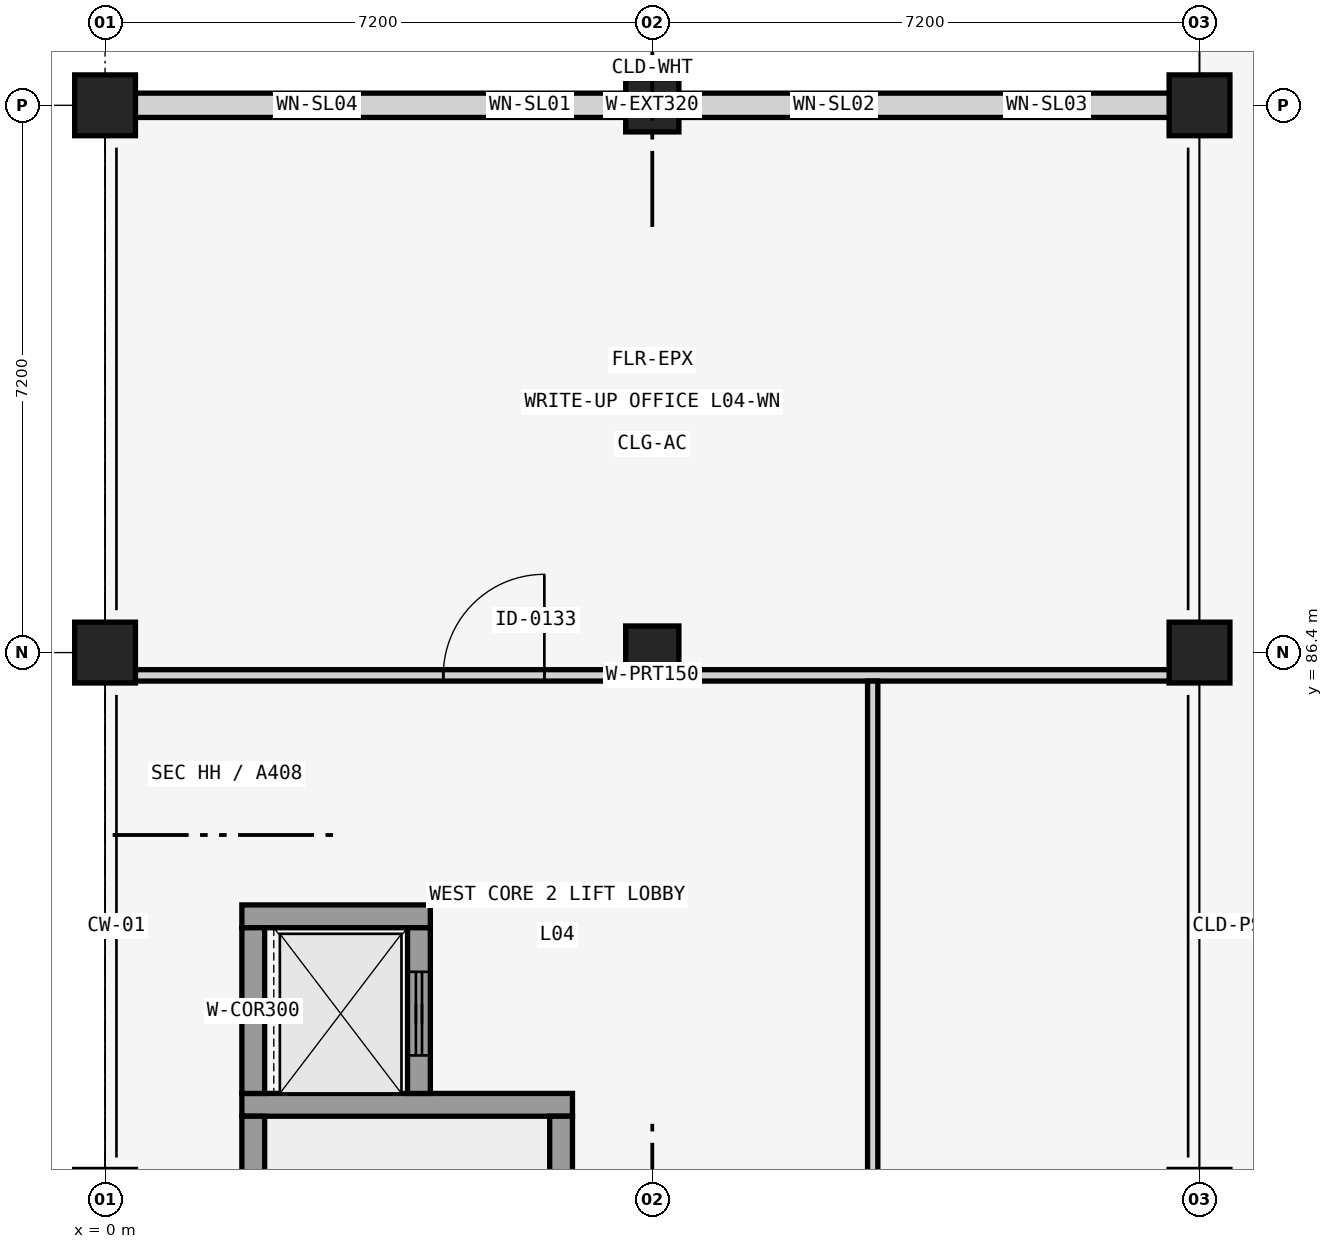
"""IFC4 building model, lengths in metres.
Left out: names, types, materials, properties, quantities, classifications, styles, units other than length and angle.
Written with IfcOpenShell. Run it as: python <this file> out.ifc"""

import sys

from ifc_helpers import new_model, si_unit, direction, frame, frame_2d, origin, origin_2d, place, context, subcontext, project, spatial, rectangle, extrude, element, fill, save


model = new_model("IFC4")
c1 = context("Model", 3, precision=1e-05, world=origin(), true_north=direction((0.0, 1.0)))
c2 = subcontext(c1, "Body", "Model", "MODEL_VIEW")
j1 = project(units=[si_unit("LENGTHUNIT", "METRE"), si_unit("PLANEANGLEUNIT", "RADIAN")], contexts=[c1])
p1 = place(None, origin())
s1 = spatial("IfcSite", under=j1, at=p1, CompositionType="ELEMENT")
p2 = place(p1, origin())
s2 = spatial("IfcBuilding", under=s1, at=p2, CompositionType="ELEMENT")
p3 = place(p2, frame((0.0, 0.0, 17.28)))
s3 = spatial("IfcBuildingStorey", under=s2, at=p3, CompositionType="ELEMENT", Elevation=17.28)
for number, where, z_axis, x_axis in (
    (1, (0.0, 86.4, 0.0), (0.0, 0.0, 1.0), (1.0, 0.0, 0.0)),
    (2, (0.0, 93.6, 0.0), (0.0, 0.0, 1.0), (1.0, 0.0, 0.0)),
):
    element("IfcColumn", number, at=place(p3, frame(where, z_axis=z_axis, x_axis=x_axis)), inside=s3, PredefinedType="COLUMN", context=c2, shape_type="SweptSolid", body=[
        extrude(rectangle(XDim=0.8, YDim=0.8, at=origin_2d()), origin(), (0.0, 0.0, 1.0), 4.16),
    ])
for number, where, z_axis, x_axis in (
    (3, (7.2, 86.4, 0.0), (0.0, 0.0, 1.0), (1.0, 0.0, 0.0)),
    (4, (7.2, 93.6, 0.0), (0.0, 0.0, 1.0), (1.0, 0.0, 0.0)),
):
    element("IfcColumn", number, at=place(p3, frame(where, z_axis=z_axis, x_axis=x_axis)), inside=s3, PredefinedType="COLUMN", context=c2, shape_type="SweptSolid", body=[
        extrude(rectangle(XDim=0.7, YDim=0.7, at=origin_2d()), origin(), (0.0, 0.0, 1.0), 4.16),
    ])
for number, where, z_axis, x_axis in (
    (5, (14.4, 86.4, 0.0), (0.0, 0.0, 1.0), (1.0, 0.0, 0.0)),
    (6, (14.4, 93.6, 0.0), (0.0, 0.0, 1.0), (1.0, 0.0, 0.0)),
):
    element("IfcColumn", number, at=place(p3, frame(where, z_axis=z_axis, x_axis=x_axis)), inside=s3, PredefinedType="COLUMN", context=c2, shape_type="SweptSolid", body=[
        extrude(rectangle(XDim=0.8, YDim=0.8, at=origin_2d()), origin(), (0.0, 0.0, 1.0), 4.16),
    ])
p4 = place(p3, frame((0.39, 93.6, 0.0), z_axis=(0.0, 0.0, 1.0), x_axis=(1.0, 0.0, 0.0)))
e7 = element("IfcWall", 7, at=p4, inside=s3, PredefinedType="SOLIDWALL", context=c2, shape_type="SweptSolid", body=[
    extrude(rectangle(XDim=13.62, YDim=0.32, at=frame_2d((6.81, 0.0))), origin(), (0.0, 0.0, 1.0), 3.42),
])
p5 = place(p4, frame((2.175, 0.0, 0.85)))
e8 = element("IfcOpeningElement", 8, at=p5, cuts=e7, PredefinedType="OPENING", context=c2, shape_type="SweptSolid", body=[
    extrude(rectangle(XDim=0.45, YDim=2.1, at=frame_2d((0.225, 1.05))), frame((0.0, 0.17, 0.0), z_axis=(0.0, -1.0, 0.0), x_axis=(1.0, 0.0, 0.0)), (0.0, 0.0, 1.0), 0.34),
])
p6 = place(p4, frame((4.975, 0.0, 0.85)))
e9 = element("IfcOpeningElement", 9, at=p6, cuts=e7, PredefinedType="OPENING", context=c2, shape_type="SweptSolid", body=[
    extrude(rectangle(XDim=0.45, YDim=2.4, at=frame_2d((0.225, 1.2))), frame((0.0, 0.17, 0.0), z_axis=(0.0, -1.0, 0.0), x_axis=(1.0, 0.0, 0.0)), (0.0, 0.0, 1.0), 0.34),
])
p7 = place(p4, frame((8.95, 0.0, 0.85)))
e10 = element("IfcOpeningElement", 10, at=p7, cuts=e7, PredefinedType="OPENING", context=c2, shape_type="SweptSolid", body=[
    extrude(rectangle(XDim=0.5, YDim=2.4, at=frame_2d((0.25, 1.2))), frame((0.0, 0.17, 0.0), z_axis=(0.0, -1.0, 0.0), x_axis=(1.0, 0.0, 0.0)), (0.0, 0.0, 1.0), 0.34),
])
p8 = place(p4, frame((11.725, 0.0, 0.85)))
e11 = element("IfcOpeningElement", 11, at=p8, cuts=e7, PredefinedType="OPENING", context=c2, shape_type="SweptSolid", body=[
    extrude(rectangle(XDim=0.55, YDim=2.2, at=frame_2d((0.275, 1.1))), frame((0.0, 0.17, 0.0), z_axis=(0.0, -1.0, 0.0), x_axis=(1.0, 0.0, 0.0)), (0.0, 0.0, 1.0), 0.34),
])
p9 = place(p3, frame((1.8, 80.45, 0.0), z_axis=(0.0, 0.0, 1.0), x_axis=(1.0, 0.0, 0.0)))
e12 = element("IfcWall", 12, at=p9, inside=s3, PredefinedType="SHEAR", context=c2, shape_type="SweptSolid", body=[
    extrude(rectangle(XDim=4.35, YDim=0.3, at=frame_2d((2.175, 0.0))), origin(), (0.0, 0.0, 1.0), 3.81),
])
p10 = place(p3, frame((1.95, 72.5, 0.0), z_axis=(0.0, 0.0, 1.0), x_axis=(0.0, 1.0, 0.0)))
e13 = element("IfcWall", 13, at=p10, inside=s3, PredefinedType="SHEAR", context=c2, shape_type="SweptSolid", body=[
    extrude(rectangle(XDim=7.8, YDim=0.3, at=frame_2d((3.9, 0.0))), origin(), (0.0, 0.0, 1.0), 3.81),
])
p11 = place(p3, frame((6.0, 72.5, 0.0), z_axis=(0.0, 0.0, 1.0), x_axis=(0.0, 1.0, 0.0)))
e14 = element("IfcWall", 14, at=p11, inside=s3, PredefinedType="SHEAR", context=c2, shape_type="SweptSolid", body=[
    extrude(rectangle(XDim=7.8, YDim=0.3, at=frame_2d((3.9, 0.0))), origin(), (0.0, 0.0, 1.0), 3.81),
])
p12 = place(p11, frame((0.4, 0.0, 0.0)))
e15 = element("IfcOpeningElement", 15, at=p12, cuts=e14, PredefinedType="OPENING", context=c2, shape_type="SweptSolid", body=[
    extrude(rectangle(XDim=1.15, YDim=2.2, at=frame_2d((0.575, 1.1))), frame((0.0, 0.16, 0.0), z_axis=(0.0, -1.0, 0.0), x_axis=(1.0, 0.0, 0.0)), (0.0, 0.0, 1.0), 0.32),
])
p13 = place(p3, frame((1.8, 82.93, 0.0), z_axis=(0.0, 0.0, 1.0), x_axis=(1.0, 0.0, 0.0)))
e16 = element("IfcWall", 16, at=p13, inside=s3, PredefinedType="SHEAR", context=c2, shape_type="SweptSolid", body=[
    extrude(rectangle(XDim=2.48, YDim=0.3, at=frame_2d((1.24, 0.0))), origin(), (0.0, 0.0, 1.0), 3.81),
])
p14 = place(p3, frame((1.95, 80.6, 0.0), z_axis=(0.0, 0.0, 1.0), x_axis=(0.0, 1.0, 0.0)))
e17 = element("IfcWall", 17, at=p14, inside=s3, PredefinedType="SHEAR", context=c2, shape_type="SweptSolid", body=[
    extrude(rectangle(XDim=2.18, YDim=0.3, at=frame_2d((1.09, 0.0))), origin(), (0.0, 0.0, 1.0), 3.81),
])
p15 = place(p3, frame((4.13, 80.6, 0.0), z_axis=(0.0, 0.0, 1.0), x_axis=(0.0, 1.0, 0.0)))
e18 = element("IfcWall", 18, at=p15, inside=s3, PredefinedType="SHEAR", context=c2, shape_type="SweptSolid", body=[
    extrude(rectangle(XDim=2.18, YDim=0.3, at=frame_2d((1.09, 0.0))), origin(), (0.0, 0.0, 1.0), 3.81),
])
p16 = place(p15, frame((0.5, 0.0, 0.0)))
e19 = element("IfcOpeningElement", 19, at=p16, cuts=e18, PredefinedType="OPENING", context=c2, shape_type="SweptSolid", body=[
    extrude(rectangle(XDim=1.1, YDim=2.2, at=frame_2d((0.55, 1.1))), frame((0.0, 0.16, 0.0), z_axis=(0.0, -1.0, 0.0), x_axis=(1.0, 0.0, 0.0)), (0.0, 0.0, 1.0), 0.32),
])
p17 = place(p3, frame((0.25, 86.1, 0.0), z_axis=(0.0, 0.0, 1.0), x_axis=(1.0, 0.0, 0.0)))
e20 = element("IfcWall", 20, at=p17, inside=s3, PredefinedType="PARTITIONING", context=c2, shape_type="SweptSolid", body=[
    extrude(rectangle(XDim=13.9, YDim=0.15, at=frame_2d((6.95, 0.0))), origin(), (0.0, 0.0, 1.0), 3.21),
])
p18 = place(p17, frame((4.2, 0.0, 0.0)))
e21 = element("IfcOpeningElement", 21, at=p18, cuts=e20, PredefinedType="OPENING", context=c2, shape_type="SweptSolid", body=[
    extrude(rectangle(XDim=1.33, YDim=2.12, at=frame_2d((0.665, 1.06))), frame((0.0, 0.085, 0.0), z_axis=(0.0, -1.0, 0.0), x_axis=(1.0, 0.0, 0.0)), (0.0, 0.0, 1.0), 0.17),
])
p19 = place(p3, frame((10.1, 70.1, 0.0), z_axis=(0.0, 0.0, 1.0), x_axis=(0.0, 1.0, 0.0)))
e22 = element("IfcWall", 22, at=p19, inside=s3, PredefinedType="PARTITIONING", context=c2, shape_type="SweptSolid", body=[
    extrude(rectangle(XDim=15.925, YDim=0.135, at=frame_2d((7.962, 0.0))), origin(), (0.0, 0.0, 1.0), 3.21),
])
p20 = place(p19, frame((7.198, 0.0, 0.0)))
e23 = element("IfcOpeningElement", 23, at=p20, cuts=e22, PredefinedType="OPENING", context=c2, shape_type="SweptSolid", body=[
    extrude(rectangle(XDim=1.53, YDim=2.18, at=frame_2d((0.765, 1.09))), frame((0.0, 0.078, 0.0), z_axis=(0.0, -1.0, 0.0), x_axis=(1.0, 0.0, 0.0)), (0.0, 0.0, 1.0), 0.155),
])
p21 = place(p5, origin())
e24 = element("IfcWindow", 24, at=p21, inside=s3, PartitioningType="SINGLE_PANEL", PredefinedType="WINDOW", context=c2, shape_type="SweptSolid", body=[
    extrude(rectangle(XDim=0.45, YDim=2.1, at=frame_2d((0.225, 1.05))), frame((0.0, 0.03, 0.0), z_axis=(0.0, -1.0, 0.0), x_axis=(1.0, 0.0, 0.0)), (0.0, 0.0, 1.0), 0.06),
])
fill(e8, e24)
p22 = place(p6, origin())
e25 = element("IfcWindow", 25, at=p22, inside=s3, PartitioningType="SINGLE_PANEL", PredefinedType="WINDOW", context=c2, shape_type="SweptSolid", body=[
    extrude(rectangle(XDim=0.45, YDim=2.4, at=frame_2d((0.225, 1.2))), frame((0.0, 0.03, 0.0), z_axis=(0.0, -1.0, 0.0), x_axis=(1.0, 0.0, 0.0)), (0.0, 0.0, 1.0), 0.06),
])
fill(e9, e25)
p23 = place(p7, origin())
e26 = element("IfcWindow", 26, at=p23, inside=s3, PartitioningType="SINGLE_PANEL", PredefinedType="WINDOW", context=c2, shape_type="SweptSolid", body=[
    extrude(rectangle(XDim=0.5, YDim=2.4, at=frame_2d((0.25, 1.2))), frame((0.0, 0.03, 0.0), z_axis=(0.0, -1.0, 0.0), x_axis=(1.0, 0.0, 0.0)), (0.0, 0.0, 1.0), 0.06),
])
fill(e10, e26)
p24 = place(p8, origin())
e27 = element("IfcWindow", 27, at=p24, inside=s3, PartitioningType="SINGLE_PANEL", PredefinedType="WINDOW", context=c2, shape_type="SweptSolid", body=[
    extrude(rectangle(XDim=0.55, YDim=2.2, at=frame_2d((0.275, 1.1))), frame((0.0, 0.03, 0.0), z_axis=(0.0, -1.0, 0.0), x_axis=(1.0, 0.0, 0.0)), (0.0, 0.0, 1.0), 0.06),
])
fill(e11, e27)
p25 = place(p16, origin())
e28 = element("IfcDoor", 28, at=p25, inside=s3, OperationType="SLIDING_TO_LEFT", PredefinedType="DOOR", context=c2, shape_type="SweptSolid", body=[
    extrude(rectangle(XDim=1.1, YDim=2.2, at=frame_2d((0.55, 1.1))), frame((0.0, 0.025, 0.0), z_axis=(0.0, -1.0, 0.0), x_axis=(1.0, 0.0, 0.0)), (0.0, 0.0, 1.0), 0.05),
])
fill(e19, e28)
p26 = place(p18, origin())
e29 = element("IfcDoor", 29, at=p26, inside=s3, OperationType="SINGLE_SWING_RIGHT", PredefinedType="DOOR", context=c2, shape_type="SweptSolid", body=[
    extrude(rectangle(XDim=1.33, YDim=2.12, at=frame_2d((0.665, 1.06))), frame((0.0, 0.025, 0.0), z_axis=(0.0, -1.0, 0.0), x_axis=(1.0, 0.0, 0.0)), (0.0, 0.0, 1.0), 0.05),
])
fill(e21, e29)
save(model, sys.argv[1])
